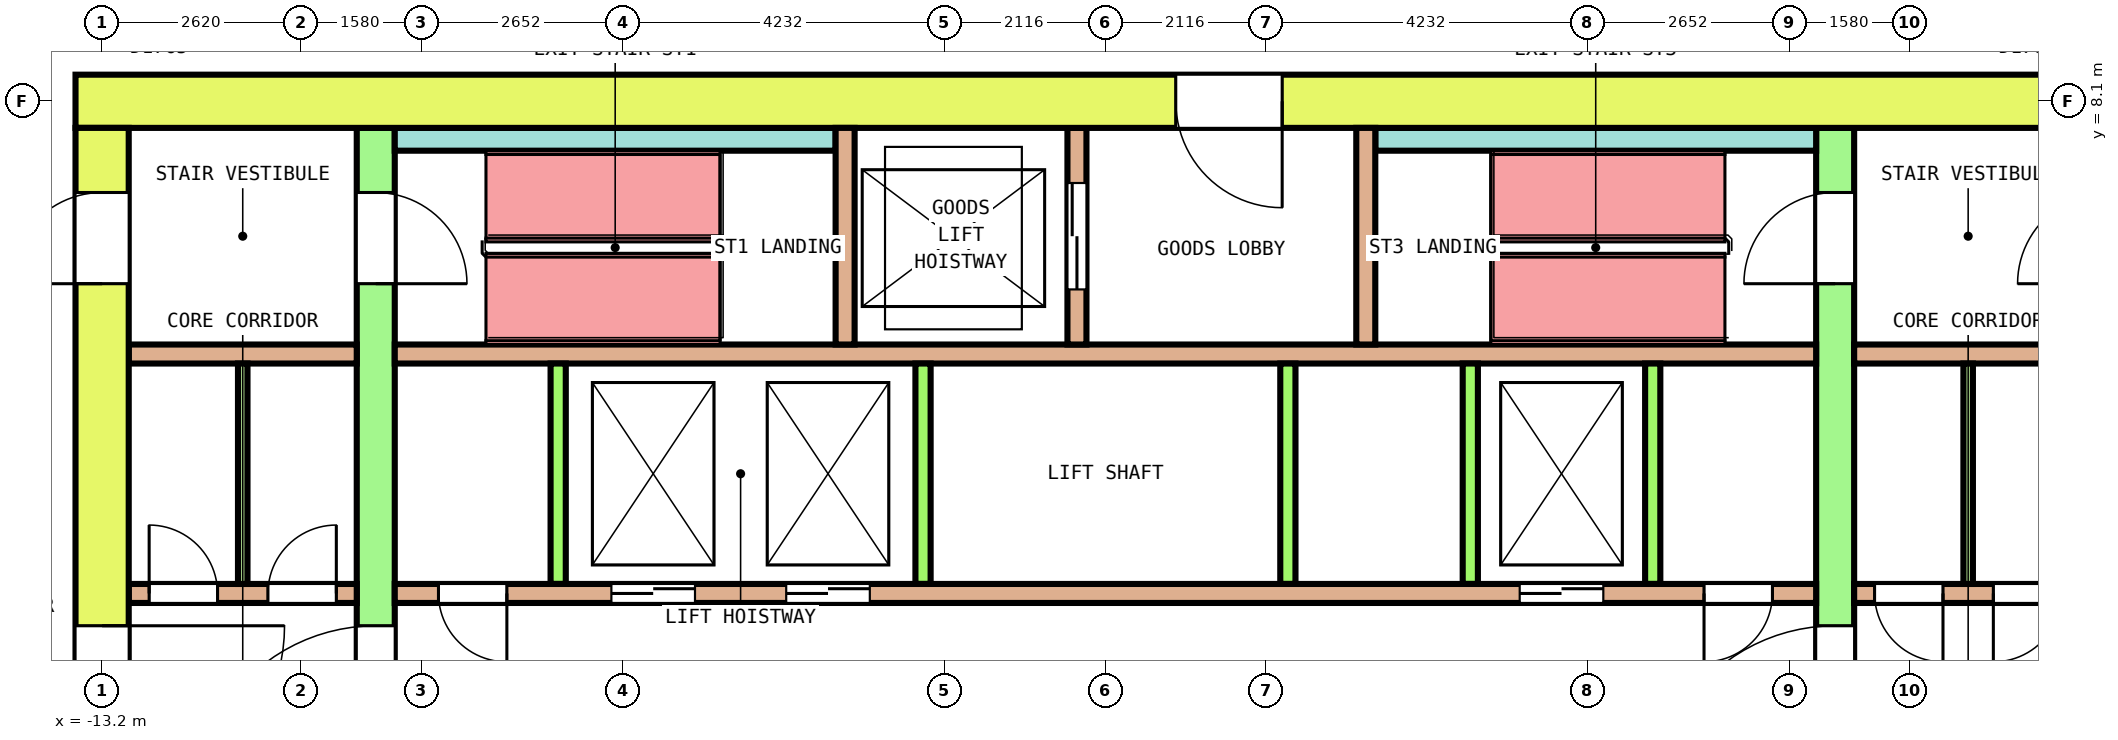
"""IFC4 building model, lengths in metres.
Left out: names, types, materials, properties, quantities, classifications, styles, units other than length and angle.
Written with IfcOpenShell. Run it as: python <this file> out.ifc"""

import sys

from ifc_helpers import new_model, si_unit, direction, frame, frame_2d, origin, place, context, subcontext, project, spatial, rectangle, extrude, element, fill, save


model = new_model("IFC4")
c1 = context("Model", 3, precision=1e-05, world=origin(), true_north=direction((0.0, 1.0)))
c2 = subcontext(c1, "Body", "Model", "MODEL_VIEW")
j1 = project(units=[si_unit("LENGTHUNIT", "METRE"), si_unit("PLANEANGLEUNIT", "RADIAN")], contexts=[c1])
p1 = place(None, origin())
s1 = spatial("IfcSite", under=j1, at=p1, CompositionType="ELEMENT")
p2 = place(p1, origin())
s2 = spatial("IfcBuilding", under=s1, at=p2, CompositionType="ELEMENT")
p3 = place(p2, frame((0.0, 0.0, 162.8)))
s3 = spatial("IfcBuildingStorey", under=s2, at=p3, CompositionType="ELEMENT", Elevation=162.8)
p4 = place(p3, frame((-13.55, 8.1, 0.0), z_axis=(0.0, 0.0, 1.0), x_axis=(1.0, 0.0, 0.0)))
e1 = element("IfcWall", 1, at=p4, inside=s3, PredefinedType="SHEAR", context=c2, shape_type="SweptSolid", body=[
    extrude(rectangle(XDim=27.1, YDim=0.7, at=frame_2d((13.55, 0.0))), origin(), (0.0, 0.0, 1.0), 4.1),
])
p5 = place(p4, frame((14.475, 0.0, 0.0)))
e2 = element("IfcOpeningElement", 2, at=p5, cuts=e1, PredefinedType="OPENING", context=c2, shape_type="SweptSolid", body=[
    extrude(rectangle(XDim=1.4, YDim=2.1, at=frame_2d((0.7, 1.05))), frame((0.0, 0.36, 0.0), z_axis=(0.0, -1.0, 0.0), x_axis=(1.0, 0.0, 0.0)), (0.0, 0.0, 1.0), 0.72),
])
p6 = place(p3, frame((-13.2, -7.75, 0.0), z_axis=(0.0, 0.0, 1.0), x_axis=(0.0, 1.0, 0.0)))
e3 = element("IfcWall", 3, at=p6, inside=s3, PredefinedType="SHEAR", context=c2, shape_type="SweptSolid", body=[
    extrude(rectangle(XDim=15.5, YDim=0.7, at=frame_2d((7.75, 0.0))), origin(), (0.0, 0.0, 1.0), 4.1),
])
p7 = place(p6, frame((6.55, 0.0, 0.0)))
e4 = element("IfcOpeningElement", 4, at=p7, cuts=e3, PredefinedType="OPENING", context=c2, shape_type="SweptSolid", body=[
    extrude(rectangle(XDim=2.4, YDim=2.1, at=frame_2d((1.2, 1.05))), frame((0.0, 0.36, 0.0), z_axis=(0.0, -1.0, 0.0), x_axis=(1.0, 0.0, 0.0)), (0.0, 0.0, 1.0), 0.72),
])
p8 = place(p6, frame((13.45, 0.0, 0.0)))
e5 = element("IfcOpeningElement", 5, at=p8, cuts=e3, PredefinedType="OPENING", context=c2, shape_type="SweptSolid", body=[
    extrude(rectangle(XDim=1.2, YDim=2.1, at=frame_2d((0.6, 1.05))), frame((0.0, 0.36, 0.0), z_axis=(0.0, -1.0, 0.0), x_axis=(1.0, 0.0, 0.0)), (0.0, 0.0, 1.0), 0.72),
])
p9 = place(p6, frame((0.85, 0.0, 0.0)))
e6 = element("IfcOpeningElement", 6, at=p9, cuts=e3, PredefinedType="OPENING", context=c2, shape_type="SweptSolid", body=[
    extrude(rectangle(XDim=1.2, YDim=2.1, at=frame_2d((0.6, 1.05))), frame((0.0, 0.36, 0.0), z_axis=(0.0, -1.0, 0.0), x_axis=(1.0, 0.0, 0.0)), (0.0, 0.0, 1.0), 0.72),
])
p10 = place(p3, frame((-9.6, -7.75, 0.0), z_axis=(0.0, 0.0, 1.0), x_axis=(0.0, 1.0, 0.0)))
e7 = element("IfcWall", 7, at=p10, inside=s3, PredefinedType="SHEAR", context=c2, shape_type="SweptSolid", body=[
    extrude(rectangle(XDim=15.5, YDim=0.5, at=frame_2d((7.75, 0.0))), origin(), (0.0, 0.0, 1.0), 4.1),
])
p11 = place(p10, frame((6.55, 0.0, 0.0)))
e8 = element("IfcOpeningElement", 8, at=p11, cuts=e7, PredefinedType="OPENING", context=c2, shape_type="SweptSolid", body=[
    extrude(rectangle(XDim=2.4, YDim=2.1, at=frame_2d((1.2, 1.05))), frame((0.0, 0.26, 0.0), z_axis=(0.0, -1.0, 0.0), x_axis=(1.0, 0.0, 0.0)), (0.0, 0.0, 1.0), 0.52),
])
p12 = place(p10, frame((13.45, 0.0, 0.0)))
e9 = element("IfcOpeningElement", 9, at=p12, cuts=e7, PredefinedType="OPENING", context=c2, shape_type="SweptSolid", body=[
    extrude(rectangle(XDim=1.2, YDim=2.1, at=frame_2d((0.6, 1.05))), frame((0.0, 0.26, 0.0), z_axis=(0.0, -1.0, 0.0), x_axis=(1.0, 0.0, 0.0)), (0.0, 0.0, 1.0), 0.52),
])
p13 = place(p10, frame((0.85, 0.0, 0.0)))
e10 = element("IfcOpeningElement", 10, at=p13, cuts=e7, PredefinedType="OPENING", context=c2, shape_type="SweptSolid", body=[
    extrude(rectangle(XDim=1.2, YDim=2.1, at=frame_2d((0.6, 1.05))), frame((0.0, 0.26, 0.0), z_axis=(0.0, -1.0, 0.0), x_axis=(1.0, 0.0, 0.0)), (0.0, 0.0, 1.0), 0.52),
])
p14 = place(p3, frame((9.6, -7.75, 0.0), z_axis=(0.0, 0.0, 1.0), x_axis=(0.0, 1.0, 0.0)))
e11 = element("IfcWall", 11, at=p14, inside=s3, PredefinedType="SHEAR", context=c2, shape_type="SweptSolid", body=[
    extrude(rectangle(XDim=15.5, YDim=0.5, at=frame_2d((7.75, 0.0))), origin(), (0.0, 0.0, 1.0), 4.1),
])
p15 = place(p14, frame((6.55, 0.0, 0.0)))
e12 = element("IfcOpeningElement", 12, at=p15, cuts=e11, PredefinedType="OPENING", context=c2, shape_type="SweptSolid", body=[
    extrude(rectangle(XDim=2.4, YDim=2.1, at=frame_2d((1.2, 1.05))), frame((0.0, 0.26, 0.0), z_axis=(0.0, -1.0, 0.0), x_axis=(1.0, 0.0, 0.0)), (0.0, 0.0, 1.0), 0.52),
])
p16 = place(p14, frame((13.45, 0.0, 0.0)))
e13 = element("IfcOpeningElement", 13, at=p16, cuts=e11, PredefinedType="OPENING", context=c2, shape_type="SweptSolid", body=[
    extrude(rectangle(XDim=1.2, YDim=2.1, at=frame_2d((0.6, 1.05))), frame((0.0, 0.26, 0.0), z_axis=(0.0, -1.0, 0.0), x_axis=(1.0, 0.0, 0.0)), (0.0, 0.0, 1.0), 0.52),
])
p17 = place(p14, frame((0.95, 0.0, 0.0)))
e14 = element("IfcOpeningElement", 14, at=p17, cuts=e11, PredefinedType="OPENING", context=c2, shape_type="SweptSolid", body=[
    extrude(rectangle(XDim=1.0, YDim=2.1, at=frame_2d((0.5, 1.05))), frame((0.0, 0.26, 0.0), z_axis=(0.0, -1.0, 0.0), x_axis=(1.0, 0.0, 0.0)), (0.0, 0.0, 1.0), 0.52),
])
p18 = place(p3, frame((-12.85, 1.625, 0.0), z_axis=(0.0, 0.0, 1.0), x_axis=(1.0, 0.0, 0.0)))
e15 = element("IfcWall", 15, at=p18, inside=s3, PredefinedType="SOLIDWALL", context=c2, shape_type="SweptSolid", body=[
    extrude(rectangle(XDim=3.0, YDim=0.25, at=frame_2d((1.5, 0.0))), origin(), (0.0, 0.0, 1.0), 4.1),
])
p19 = place(p18, frame((0.269, 0.0, 0.0)))
e16 = element("IfcOpeningElement", 16, at=p19, cuts=e15, PredefinedType="OPENING", context=c2, shape_type="SweptSolid", body=[
    extrude(rectangle(XDim=0.9, YDim=2.1, at=frame_2d((0.45, 1.05))), frame((0.0, 0.135, 0.0), z_axis=(0.0, -1.0, 0.0), x_axis=(1.0, 0.0, 0.0)), (0.0, 0.0, 1.0), 0.27),
])
p20 = place(p18, frame((1.831, 0.0, 0.0)))
e17 = element("IfcOpeningElement", 17, at=p20, cuts=e15, PredefinedType="OPENING", context=c2, shape_type="SweptSolid", body=[
    extrude(rectangle(XDim=0.9, YDim=2.1, at=frame_2d((0.45, 1.05))), frame((0.0, 0.135, 0.0), z_axis=(0.0, -1.0, 0.0), x_axis=(1.0, 0.0, 0.0)), (0.0, 0.0, 1.0), 0.27),
])
p21 = place(p3, frame((-9.35, 1.625, 0.0), z_axis=(0.0, 0.0, 1.0), x_axis=(1.0, 0.0, 0.0)))
e18 = element("IfcWall", 18, at=p21, inside=s3, PredefinedType="SOLIDWALL", context=c2, shape_type="SweptSolid", body=[
    extrude(rectangle(XDim=18.7, YDim=0.25, at=frame_2d((9.35, 0.0))), origin(), (0.0, 0.0, 1.0), 4.1),
])
p22 = place(p21, frame((2.85, 0.0, 0.0)))
e19 = element("IfcOpeningElement", 19, at=p22, cuts=e18, PredefinedType="OPENING", context=c2, shape_type="SweptSolid", body=[
    extrude(rectangle(XDim=1.1, YDim=2.1, at=frame_2d((0.55, 1.05))), frame((0.0, 0.135, 0.0), z_axis=(0.0, -1.0, 0.0), x_axis=(1.0, 0.0, 0.0)), (0.0, 0.0, 1.0), 0.27),
])
p23 = place(p21, frame((5.15, 0.0, 0.0)))
e20 = element("IfcOpeningElement", 20, at=p23, cuts=e18, PredefinedType="OPENING", context=c2, shape_type="SweptSolid", body=[
    extrude(rectangle(XDim=1.1, YDim=2.1, at=frame_2d((0.55, 1.05))), frame((0.0, 0.135, 0.0), z_axis=(0.0, -1.0, 0.0), x_axis=(1.0, 0.0, 0.0)), (0.0, 0.0, 1.0), 0.27),
])
p24 = place(p21, frame((14.8, 0.0, 0.0)))
e21 = element("IfcOpeningElement", 21, at=p24, cuts=e18, PredefinedType="OPENING", context=c2, shape_type="SweptSolid", body=[
    extrude(rectangle(XDim=1.1, YDim=2.1, at=frame_2d((0.55, 1.05))), frame((0.0, 0.135, 0.0), z_axis=(0.0, -1.0, 0.0), x_axis=(1.0, 0.0, 0.0)), (0.0, 0.0, 1.0), 0.27),
])
p25 = place(p21, frame((0.575, 0.0, 0.0)))
e22 = element("IfcOpeningElement", 22, at=p25, cuts=e18, PredefinedType="OPENING", context=c2, shape_type="SweptSolid", body=[
    extrude(rectangle(XDim=0.9, YDim=2.1, at=frame_2d((0.45, 1.05))), frame((0.0, 0.135, 0.0), z_axis=(0.0, -1.0, 0.0), x_axis=(1.0, 0.0, 0.0)), (0.0, 0.0, 1.0), 0.27),
])
p26 = place(p21, frame((17.225, 0.0, 0.0)))
e23 = element("IfcOpeningElement", 23, at=p26, cuts=e18, PredefinedType="OPENING", context=c2, shape_type="SweptSolid", body=[
    extrude(rectangle(XDim=0.9, YDim=2.1, at=frame_2d((0.45, 1.05))), frame((0.0, 0.135, 0.0), z_axis=(0.0, -1.0, 0.0), x_axis=(1.0, 0.0, 0.0)), (0.0, 0.0, 1.0), 0.27),
])
p27 = place(p3, frame((9.85, 1.625, 0.0), z_axis=(0.0, 0.0, 1.0), x_axis=(1.0, 0.0, 0.0)))
e24 = element("IfcWall", 24, at=p27, inside=s3, PredefinedType="SOLIDWALL", context=c2, shape_type="SweptSolid", body=[
    extrude(rectangle(XDim=3.0, YDim=0.25, at=frame_2d((1.5, 0.0))), origin(), (0.0, 0.0, 1.0), 4.1),
])
p28 = place(p27, frame((0.269, 0.0, 0.0)))
e25 = element("IfcOpeningElement", 25, at=p28, cuts=e24, PredefinedType="OPENING", context=c2, shape_type="SweptSolid", body=[
    extrude(rectangle(XDim=0.9, YDim=2.1, at=frame_2d((0.45, 1.05))), frame((0.0, 0.135, 0.0), z_axis=(0.0, -1.0, 0.0), x_axis=(1.0, 0.0, 0.0)), (0.0, 0.0, 1.0), 0.27),
])
p29 = place(p27, frame((1.831, 0.0, 0.0)))
e26 = element("IfcOpeningElement", 26, at=p29, cuts=e24, PredefinedType="OPENING", context=c2, shape_type="SweptSolid", body=[
    extrude(rectangle(XDim=0.9, YDim=2.1, at=frame_2d((0.45, 1.05))), frame((0.0, 0.135, 0.0), z_axis=(0.0, -1.0, 0.0), x_axis=(1.0, 0.0, 0.0)), (0.0, 0.0, 1.0), 0.27),
])
p30 = place(p3, frame((-12.85, 4.775, 0.0), z_axis=(0.0, 0.0, 1.0), x_axis=(1.0, 0.0, 0.0)))
e27 = element("IfcWall", 27, at=p30, inside=s3, PredefinedType="SOLIDWALL", context=c2, shape_type="SweptSolid", body=[
    extrude(rectangle(XDim=3.0, YDim=0.25, at=frame_2d((1.5, 0.0))), origin(), (0.0, 0.0, 1.0), 4.1),
])
p31 = place(p3, frame((-9.35, 4.775, 0.0), z_axis=(0.0, 0.0, 1.0), x_axis=(1.0, 0.0, 0.0)))
e28 = element("IfcWall", 28, at=p31, inside=s3, PredefinedType="SOLIDWALL", context=c2, shape_type="SweptSolid", body=[
    extrude(rectangle(XDim=18.7, YDim=0.25, at=frame_2d((9.35, 0.0))), origin(), (0.0, 0.0, 1.0), 4.1),
])
p32 = place(p3, frame((9.85, 4.775, 0.0), z_axis=(0.0, 0.0, 1.0), x_axis=(1.0, 0.0, 0.0)))
e29 = element("IfcWall", 29, at=p32, inside=s3, PredefinedType="SOLIDWALL", context=c2, shape_type="SweptSolid", body=[
    extrude(rectangle(XDim=3.0, YDim=0.25, at=frame_2d((1.5, 0.0))), origin(), (0.0, 0.0, 1.0), 4.1),
])
for number, where, z_axis, x_axis in (
    (30, (-7.2, 1.75, 0.0), (0.0, 0.0, 1.0), (0.0, 1.0, 0.0)),
    (31, (-2.4, 1.75, 0.0), (0.0, 0.0, 1.0), (0.0, 1.0, 0.0)),
    (32, (2.4, 1.75, 0.0), (0.0, 0.0, 1.0), (0.0, 1.0, 0.0)),
    (33, (4.8, 1.75, 0.0), (0.0, 0.0, 1.0), (0.0, 1.0, 0.0)),
    (34, (7.2, 1.75, 0.0), (0.0, 0.0, 1.0), (0.0, 1.0, 0.0)),
):
    element("IfcWall", number, at=place(p3, frame(where, z_axis=z_axis, x_axis=x_axis)), inside=s3, PredefinedType="SOLIDWALL", context=c2, shape_type="SweptSolid", body=[
        extrude(rectangle(XDim=2.9, YDim=0.2, at=frame_2d((1.45, 0.0))), origin(), (0.0, 0.0, 1.0), 4.1),
    ])
for number, where, z_axis, x_axis in (
    (35, (-9.35, 7.6, 0.0), (0.0, 0.0, 1.0), (1.0, 0.0, 0.0)),
    (36, (3.55, 7.6, 0.0), (0.0, 0.0, 1.0), (1.0, 0.0, 0.0)),
):
    element("IfcWall", number, at=place(p3, frame(where, z_axis=z_axis, x_axis=x_axis)), inside=s3, PredefinedType="SOLIDWALL", context=c2, shape_type="SweptSolid", body=[
        extrude(rectangle(XDim=5.8, YDim=0.3, at=frame_2d((2.9, 0.0))), origin(), (0.0, 0.0, 1.0), 4.1),
    ])
p33 = place(p3, frame((-3.425, 4.9, 0.0), z_axis=(0.0, 0.0, 1.0), x_axis=(0.0, 1.0, 0.0)))
e37 = element("IfcWall", 37, at=p33, inside=s3, PredefinedType="SOLIDWALL", context=c2, shape_type="SweptSolid", body=[
    extrude(rectangle(XDim=2.85, YDim=0.25, at=frame_2d((1.425, 0.0))), origin(), (0.0, 0.0, 1.0), 4.1),
])
p34 = place(p3, frame((-0.375, 4.9, 0.0), z_axis=(0.0, 0.0, 1.0), x_axis=(0.0, 1.0, 0.0)))
e38 = element("IfcWall", 38, at=p34, inside=s3, PredefinedType="SOLIDWALL", context=c2, shape_type="SweptSolid", body=[
    extrude(rectangle(XDim=2.85, YDim=0.25, at=frame_2d((1.425, 0.0))), origin(), (0.0, 0.0, 1.0), 4.1),
])
p35 = place(p34, frame((0.725, 0.0, 0.0)))
e39 = element("IfcOpeningElement", 39, at=p35, cuts=e38, PredefinedType="OPENING", context=c2, shape_type="SweptSolid", body=[
    extrude(rectangle(XDim=1.4, YDim=2.1, at=frame_2d((0.7, 1.05))), frame((0.0, 0.135, 0.0), z_axis=(0.0, -1.0, 0.0), x_axis=(1.0, 0.0, 0.0)), (0.0, 0.0, 1.0), 0.27),
])
p36 = place(p3, frame((3.425, 4.9, 0.0), z_axis=(0.0, 0.0, 1.0), x_axis=(0.0, 1.0, 0.0)))
e40 = element("IfcWall", 40, at=p36, inside=s3, PredefinedType="SOLIDWALL", context=c2, shape_type="SweptSolid", body=[
    extrude(rectangle(XDim=2.85, YDim=0.25, at=frame_2d((1.425, 0.0))), origin(), (0.0, 0.0, 1.0), 4.1),
])
for number, where, z_axis, x_axis in (
    (41, (-11.35, 1.75, 0.0), (0.0, 0.0, 1.0), (0.0, 1.0, 0.0)),
    (42, (11.35, 1.75, 0.0), (0.0, 0.0, 1.0), (0.0, 1.0, 0.0)),
):
    element("IfcWall", number, at=place(p3, frame(where, z_axis=z_axis, x_axis=x_axis)), inside=s3, PredefinedType="PARTITIONING", context=c2, shape_type="SweptSolid", body=[
        extrude(rectangle(XDim=2.9, YDim=0.125, at=frame_2d((1.45, 0.0))), origin(), (0.0, 0.0, 1.0), 4.1),
    ])
p37 = place(p22, origin())
e43 = element("IfcDoor", 43, at=p37, inside=s3, OperationType="DOUBLE_DOOR_SLIDING", PredefinedType="DOOR", context=c2, shape_type="SweptSolid", body=[
    extrude(rectangle(XDim=1.1, YDim=2.1, at=frame_2d((0.55, 1.05))), frame((0.0, 0.075, 0.0), z_axis=(0.0, -1.0, 0.0), x_axis=(1.0, 0.0, 0.0)), (0.0, 0.0, 1.0), 0.15),
])
fill(e19, e43)
p38 = place(p23, origin())
e44 = element("IfcDoor", 44, at=p38, inside=s3, OperationType="DOUBLE_DOOR_SLIDING", PredefinedType="DOOR", context=c2, shape_type="SweptSolid", body=[
    extrude(rectangle(XDim=1.1, YDim=2.1, at=frame_2d((0.55, 1.05))), frame((0.0, 0.075, 0.0), z_axis=(0.0, -1.0, 0.0), x_axis=(1.0, 0.0, 0.0)), (0.0, 0.0, 1.0), 0.15),
])
fill(e20, e44)
p39 = place(p24, origin())
e45 = element("IfcDoor", 45, at=p39, inside=s3, OperationType="DOUBLE_DOOR_SLIDING", PredefinedType="DOOR", context=c2, shape_type="SweptSolid", body=[
    extrude(rectangle(XDim=1.1, YDim=2.1, at=frame_2d((0.55, 1.05))), frame((0.0, 0.075, 0.0), z_axis=(0.0, -1.0, 0.0), x_axis=(1.0, 0.0, 0.0)), (0.0, 0.0, 1.0), 0.15),
])
fill(e21, e45)
p40 = place(p35, origin())
e46 = element("IfcDoor", 46, at=p40, inside=s3, OperationType="DOUBLE_DOOR_SLIDING", PredefinedType="DOOR", context=c2, shape_type="SweptSolid", body=[
    extrude(rectangle(XDim=1.4, YDim=2.1, at=frame_2d((0.7, 1.05))), frame((0.0, 0.075, 0.0), z_axis=(0.0, -1.0, 0.0), x_axis=(1.0, 0.0, 0.0)), (0.0, 0.0, 1.0), 0.15),
])
fill(e39, e46)
p41 = place(p11, origin())
e47 = element("IfcDoor", 47, at=p41, inside=s3, OperationType="DOUBLE_DOOR_SINGLE_SWING", PredefinedType="DOOR", context=c2, shape_type="SweptSolid", body=[
    extrude(rectangle(XDim=2.4, YDim=2.1, at=frame_2d((1.2, 1.05))), frame((0.0, 0.2, 0.0), z_axis=(0.0, -1.0, 0.0), x_axis=(1.0, 0.0, 0.0)), (0.0, 0.0, 1.0), 0.4),
])
fill(e8, e47)
p42 = place(p15, origin())
e48 = element("IfcDoor", 48, at=p42, inside=s3, OperationType="DOUBLE_DOOR_SINGLE_SWING", PredefinedType="DOOR", context=c2, shape_type="SweptSolid", body=[
    extrude(rectangle(XDim=2.4, YDim=2.1, at=frame_2d((1.2, 1.05))), frame((0.0, 0.2, 0.0), z_axis=(0.0, -1.0, 0.0), x_axis=(1.0, 0.0, 0.0)), (0.0, 0.0, 1.0), 0.4),
])
fill(e12, e48)
p43 = place(p7, origin())
e49 = element("IfcDoor", 49, at=p43, inside=s3, OperationType="DOUBLE_DOOR_SINGLE_SWING", PredefinedType="DOOR", context=c2, shape_type="SweptSolid", body=[
    extrude(rectangle(XDim=2.4, YDim=2.1, at=frame_2d((1.2, 1.05))), frame((0.0, 0.3, 0.0), z_axis=(0.0, -1.0, 0.0), x_axis=(1.0, 0.0, 0.0)), (0.0, 0.0, 1.0), 0.6),
])
fill(e4, e49)
p44 = place(p12, origin())
e50 = element("IfcDoor", 50, at=p44, inside=s3, OperationType="SINGLE_SWING_LEFT", PredefinedType="DOOR", context=c2, shape_type="SweptSolid", body=[
    extrude(rectangle(XDim=1.2, YDim=2.1, at=frame_2d((0.6, 1.05))), frame((0.0, 0.2, 0.0), z_axis=(0.0, -1.0, 0.0), x_axis=(1.0, 0.0, 0.0)), (0.0, 0.0, 1.0), 0.4),
])
fill(e9, e50)
p45 = place(p8, origin())
e51 = element("IfcDoor", 51, at=p45, inside=s3, OperationType="SINGLE_SWING_RIGHT", PredefinedType="DOOR", context=c2, shape_type="SweptSolid", body=[
    extrude(rectangle(XDim=1.2, YDim=2.1, at=frame_2d((0.6, 1.05))), frame((0.0, 0.3, 0.0), z_axis=(0.0, -1.0, 0.0), x_axis=(1.0, 0.0, 0.0)), (0.0, 0.0, 1.0), 0.6),
])
fill(e5, e51)
p46 = place(p16, origin())
e52 = element("IfcDoor", 52, at=p46, inside=s3, OperationType="SINGLE_SWING_LEFT", PredefinedType="DOOR", context=c2, shape_type="SweptSolid", body=[
    extrude(rectangle(XDim=1.2, YDim=2.1, at=frame_2d((0.6, 1.05))), frame((0.0, 0.2, 0.0), z_axis=(0.0, -1.0, 0.0), x_axis=(1.0, 0.0, 0.0)), (0.0, 0.0, 1.0), 0.4),
])
fill(e13, e52)
p47 = place(p5, origin())
e53 = element("IfcDoor", 53, at=p47, inside=s3, OperationType="DOUBLE_DOOR_SINGLE_SWING", PredefinedType="DOOR", context=c2, shape_type="SweptSolid", body=[
    extrude(rectangle(XDim=1.4, YDim=2.1, at=frame_2d((0.7, 1.05))), frame((0.0, 0.3, 0.0), z_axis=(0.0, -1.0, 0.0), x_axis=(1.0, 0.0, 0.0)), (0.0, 0.0, 1.0), 0.6),
])
fill(e2, e53)
p48 = place(p19, origin())
e54 = element("IfcDoor", 54, at=p48, inside=s3, OperationType="SINGLE_SWING_LEFT", PredefinedType="DOOR", context=c2, shape_type="SweptSolid", body=[
    extrude(rectangle(XDim=0.9, YDim=2.1, at=frame_2d((0.45, 1.05))), frame((0.0, 0.075, 0.0), z_axis=(0.0, -1.0, 0.0), x_axis=(1.0, 0.0, 0.0)), (0.0, 0.0, 1.0), 0.15),
])
fill(e16, e54)
p49 = place(p20, origin())
e55 = element("IfcDoor", 55, at=p49, inside=s3, OperationType="SINGLE_SWING_RIGHT", PredefinedType="DOOR", context=c2, shape_type="SweptSolid", body=[
    extrude(rectangle(XDim=0.9, YDim=2.1, at=frame_2d((0.45, 1.05))), frame((0.0, 0.075, 0.0), z_axis=(0.0, -1.0, 0.0), x_axis=(1.0, 0.0, 0.0)), (0.0, 0.0, 1.0), 0.15),
])
fill(e17, e55)
p50 = place(p25, origin())
e56 = element("IfcDoor", 56, at=p50, inside=s3, OperationType="SINGLE_SWING_LEFT", PredefinedType="DOOR", context=c2, shape_type="SweptSolid", body=[
    extrude(rectangle(XDim=0.9, YDim=2.1, at=frame_2d((0.45, 1.05))), frame((0.0, 0.075, 0.0), z_axis=(0.0, -1.0, 0.0), x_axis=(1.0, 0.0, 0.0)), (0.0, 0.0, 1.0), 0.15),
])
fill(e22, e56)
p51 = place(p26, origin())
e57 = element("IfcDoor", 57, at=p51, inside=s3, OperationType="SINGLE_SWING_RIGHT", PredefinedType="DOOR", context=c2, shape_type="SweptSolid", body=[
    extrude(rectangle(XDim=0.9, YDim=2.1, at=frame_2d((0.45, 1.05))), frame((0.0, 0.075, 0.0), z_axis=(0.0, -1.0, 0.0), x_axis=(1.0, 0.0, 0.0)), (0.0, 0.0, 1.0), 0.15),
])
fill(e23, e57)
p52 = place(p28, origin())
e58 = element("IfcDoor", 58, at=p52, inside=s3, OperationType="SINGLE_SWING_LEFT", PredefinedType="DOOR", context=c2, shape_type="SweptSolid", body=[
    extrude(rectangle(XDim=0.9, YDim=2.1, at=frame_2d((0.45, 1.05))), frame((0.0, 0.075, 0.0), z_axis=(0.0, -1.0, 0.0), x_axis=(1.0, 0.0, 0.0)), (0.0, 0.0, 1.0), 0.15),
])
fill(e25, e58)
p53 = place(p29, origin())
e59 = element("IfcDoor", 59, at=p53, inside=s3, OperationType="SINGLE_SWING_RIGHT", PredefinedType="DOOR", context=c2, shape_type="SweptSolid", body=[
    extrude(rectangle(XDim=0.9, YDim=2.1, at=frame_2d((0.45, 1.05))), frame((0.0, 0.075, 0.0), z_axis=(0.0, -1.0, 0.0), x_axis=(1.0, 0.0, 0.0)), (0.0, 0.0, 1.0), 0.15),
])
fill(e26, e59)
save(model, sys.argv[1])
